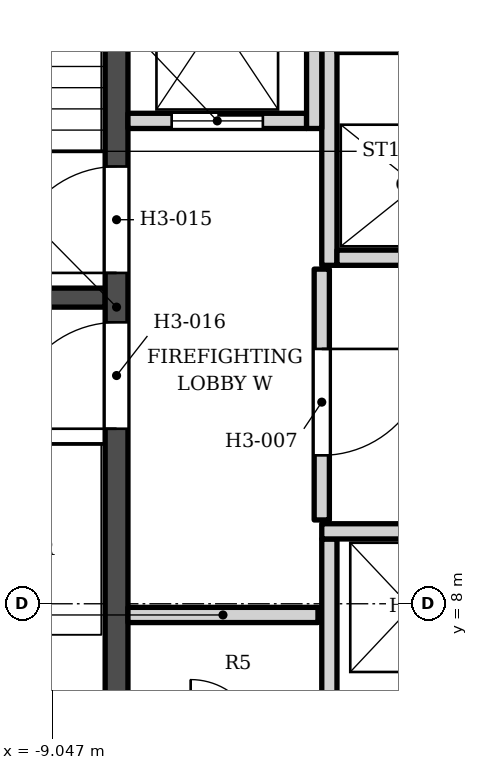
"""IFC4 building model, lengths in metres.
Left out: names, types, materials, properties, quantities, classifications, styles, units other than length and angle.
Written with IfcOpenShell. Run it as: python <this file> out.ifc"""

import sys

from ifc_helpers import new_model, si_unit, direction, frame, frame_2d, origin, place, context, subcontext, project, spatial, rectangle, extrude, element, fill, save


model = new_model("IFC4")
c1 = context("Model", 3, precision=1e-05, world=origin(), true_north=direction((0.0, 1.0)))
c2 = subcontext(c1, "Body", "Model", "MODEL_VIEW")
j1 = project(units=[si_unit("LENGTHUNIT", "METRE"), si_unit("PLANEANGLEUNIT", "RADIAN")], contexts=[c1])
p1 = place(None, origin())
s1 = spatial("IfcSite", under=j1, at=p1, CompositionType="ELEMENT")
p2 = place(p1, origin())
s2 = spatial("IfcBuilding", under=s1, at=p2, CompositionType="ELEMENT")
p3 = place(p2, frame((0.0, 0.0, 66.4)))
s3 = spatial("IfcBuildingStorey", under=s2, at=p3, CompositionType="ELEMENT", Elevation=66.4)
p4 = place(p3, frame((-8.2, 5.253, 0.0), z_axis=(0.0, 0.0, 1.0), x_axis=(0.0, 1.0, 0.0)))
e1 = element("IfcWall", 1, at=p4, inside=s3, PredefinedType="SHEAR", context=c2, shape_type="SweptSolid", body=[
    extrude(rectangle(XDim=13.3, YDim=0.3, at=frame_2d((6.65, 0.0))), origin(), (0.0, 0.0, 1.0), 3.4),
])
p5 = place(p4, frame((7.1, 0.0, 0.0)))
e2 = element("IfcOpeningElement", 2, at=p5, cuts=e1, PredefinedType="OPENING", context=c2, shape_type="SweptSolid", body=[
    extrude(rectangle(XDim=1.4, YDim=2.1, at=frame_2d((0.7, 1.05))), frame((0.0, 0.16, 0.0), z_axis=(0.0, -1.0, 0.0), x_axis=(1.0, 0.0, 0.0)), (0.0, 0.0, 1.0), 0.32),
])
p6 = place(p4, frame((5.05, 0.0, 0.0)))
e3 = element("IfcOpeningElement", 3, at=p6, cuts=e1, PredefinedType="OPENING", context=c2, shape_type="SweptSolid", body=[
    extrude(rectangle(XDim=1.4, YDim=2.1, at=frame_2d((0.7, 1.05))), frame((0.0, 0.16, 0.0), z_axis=(0.0, -1.0, 0.0), x_axis=(1.0, 0.0, 0.0)), (0.0, 0.0, 1.0), 0.32),
])
p7 = place(p3, frame((-12.1, 12.028, 0.0), z_axis=(0.0, 0.0, 1.0), x_axis=(1.0, 0.0, 0.0)))
e4 = element("IfcWall", 4, at=p7, inside=s3, PredefinedType="SHEAR", context=c2, shape_type="SweptSolid", body=[
    extrude(rectangle(XDim=3.75, YDim=0.25, at=frame_2d((1.875, 0.0))), origin(), (0.0, 0.0, 1.0), 3.4),
])
for number, where, z_axis, x_axis in (
    (5, (-5.4, 6.353, 0.0), (0.0, 0.0, 1.0), (0.0, 1.0, 0.0)),
    (6, (-8.05, 7.853, 0.0), (0.0, 0.0, 1.0), (1.0, 0.0, 0.0)),
):
    element("IfcWall", number, at=place(p3, frame(where, z_axis=z_axis, x_axis=x_axis)), inside=s3, PredefinedType="SOLIDWALL", context=c2, shape_type="SweptSolid", body=[
        extrude(rectangle(XDim=2.5, YDim=0.2, at=frame_2d((1.25, 0.0))), origin(), (0.0, 0.0, 1.0), 3.23),
    ])
p8 = place(p3, frame((-5.5, 8.953, 0.0), z_axis=(0.0, 0.0, 1.0), x_axis=(1.0, 0.0, 0.0)))
e7 = element("IfcWall", 7, at=p8, inside=s3, PredefinedType="SOLIDWALL", context=c2, shape_type="SweptSolid", body=[
    extrude(rectangle(XDim=4.5, YDim=0.2, at=frame_2d((2.25, 0.0))), origin(), (0.0, 0.0, 1.0), 3.23),
])
p9 = place(p3, frame((-5.5, 9.103, 0.0), z_axis=(0.0, 0.0, 1.0), x_axis=(0.0, 1.0, 0.0)))
e8 = element("IfcWall", 8, at=p9, inside=s3, PredefinedType="SOLIDWALL", context=c2, shape_type="SweptSolid", body=[
    extrude(rectangle(XDim=3.3, YDim=0.2, at=frame_2d((1.65, 0.0))), origin(), (0.0, 0.0, 1.0), 3.23),
])
p10 = place(p9, frame((0.85, 0.0, 0.0)))
e9 = element("IfcOpeningElement", 9, at=p10, cuts=e8, PredefinedType="OPENING", context=c2, shape_type="SweptSolid", body=[
    extrude(rectangle(XDim=1.4, YDim=2.1, at=frame_2d((0.7, 1.05))), frame((0.0, 0.11, 0.0), z_axis=(0.0, -1.0, 0.0), x_axis=(1.0, 0.0, 0.0)), (0.0, 0.0, 1.0), 0.22),
])
p11 = place(p3, frame((-5.4, 12.453, 0.0), z_axis=(0.0, 0.0, 1.0), x_axis=(0.0, 1.0, 0.0)))
e10 = element("IfcWall", 10, at=p11, inside=s3, PredefinedType="SOLIDWALL", context=c2, shape_type="SweptSolid", body=[
    extrude(rectangle(XDim=3.0, YDim=0.2, at=frame_2d((1.5, 0.0))), origin(), (0.0, 0.0, 1.0), 3.23),
])
p12 = place(p3, frame((-5.3, 12.552, 0.0), z_axis=(0.0, 0.0, 1.0), x_axis=(1.0, 0.0, 0.0)))
e11 = element("IfcWall", 11, at=p12, inside=s3, PredefinedType="SOLIDWALL", context=c2, shape_type="SweptSolid", body=[
    extrude(rectangle(XDim=2.1, YDim=0.2, at=frame_2d((1.05, 0.0))), origin(), (0.0, 0.0, 1.0), 3.23),
])
p13 = place(p3, frame((-8.05, 14.353, 0.0), z_axis=(0.0, 0.0, 1.0), x_axis=(1.0, 0.0, 0.0)))
e12 = element("IfcWall", 12, at=p13, inside=s3, PredefinedType="SOLIDWALL", context=c2, shape_type="SweptSolid", body=[
    extrude(rectangle(XDim=2.35, YDim=0.2, at=frame_2d((1.175, 0.0))), origin(), (0.0, 0.0, 1.0), 3.23),
])
p14 = place(p13, frame((0.575, 0.0, 0.0)))
e13 = element("IfcOpeningElement", 13, at=p14, cuts=e12, PredefinedType="OPENING", context=c2, shape_type="SweptSolid", body=[
    extrude(rectangle(XDim=1.2, YDim=2.1, at=frame_2d((0.6, 1.05))), frame((0.0, 0.11, 0.0), z_axis=(0.0, -1.0, 0.0), x_axis=(1.0, 0.0, 0.0)), (0.0, 0.0, 1.0), 0.22),
])
p15 = place(p3, frame((-5.6, 14.253, 0.0), z_axis=(0.0, 0.0, 1.0), x_axis=(0.0, 1.0, 0.0)))
e14 = element("IfcWall", 14, at=p15, inside=s3, PredefinedType="SOLIDWALL", context=c2, shape_type="SweptSolid", body=[
    extrude(rectangle(XDim=4.3, YDim=0.2, at=frame_2d((2.15, 0.0))), origin(), (0.0, 0.0, 1.0), 3.23),
])
p16 = place(p3, frame((-5.3, 15.353, 0.0), z_axis=(0.0, 0.0, 1.0), x_axis=(1.0, 0.0, 0.0)))
e15 = element("IfcWall", 15, at=p16, inside=s3, PredefinedType="SOLIDWALL", context=c2, shape_type="SweptSolid", body=[
    extrude(rectangle(XDim=2.1, YDim=0.2, at=frame_2d((1.05, 0.0))), origin(), (0.0, 0.0, 1.0), 3.23),
])
p17 = place(p14, origin())
e16 = element("IfcDoor", 16, at=p17, inside=s3, OperationType="DOUBLE_DOOR_SLIDING", PredefinedType="DOOR", context=c2, shape_type="SweptSolid", body=[
    extrude(rectangle(XDim=1.2, YDim=2.1, at=frame_2d((0.6, 1.05))), frame((0.0, 0.025, 0.0), z_axis=(0.0, -1.0, 0.0), x_axis=(1.0, 0.0, 0.0)), (0.0, 0.0, 1.0), 0.05),
])
fill(e13, e16)
p18 = place(p5, origin())
e17 = element("IfcDoor", 17, at=p18, inside=s3, OperationType="SINGLE_SWING_LEFT", PredefinedType="DOOR", context=c2, shape_type="SweptSolid", body=[
    extrude(rectangle(XDim=1.4, YDim=2.1, at=frame_2d((0.7, 1.05))), frame((0.0, 0.025, 0.0), z_axis=(0.0, -1.0, 0.0), x_axis=(1.0, 0.0, 0.0)), (0.0, 0.0, 1.0), 0.05),
])
fill(e2, e17)
p19 = place(p6, origin())
e18 = element("IfcDoor", 18, at=p19, inside=s3, OperationType="SINGLE_SWING_LEFT", PredefinedType="DOOR", context=c2, shape_type="SweptSolid", body=[
    extrude(rectangle(XDim=1.4, YDim=2.1, at=frame_2d((0.7, 1.05))), frame((0.0, 0.025, 0.0), z_axis=(0.0, -1.0, 0.0), x_axis=(1.0, 0.0, 0.0)), (0.0, 0.0, 1.0), 0.05),
])
fill(e3, e18)
p20 = place(p10, origin())
e19 = element("IfcDoor", 19, at=p20, inside=s3, OperationType="SINGLE_SWING_RIGHT", PredefinedType="DOOR", context=c2, shape_type="SweptSolid", body=[
    extrude(rectangle(XDim=1.4, YDim=2.1, at=frame_2d((0.7, 1.05))), frame((0.0, 0.025, 0.0), z_axis=(0.0, -1.0, 0.0), x_axis=(1.0, 0.0, 0.0)), (0.0, 0.0, 1.0), 0.05),
])
fill(e9, e19)
save(model, sys.argv[1])
